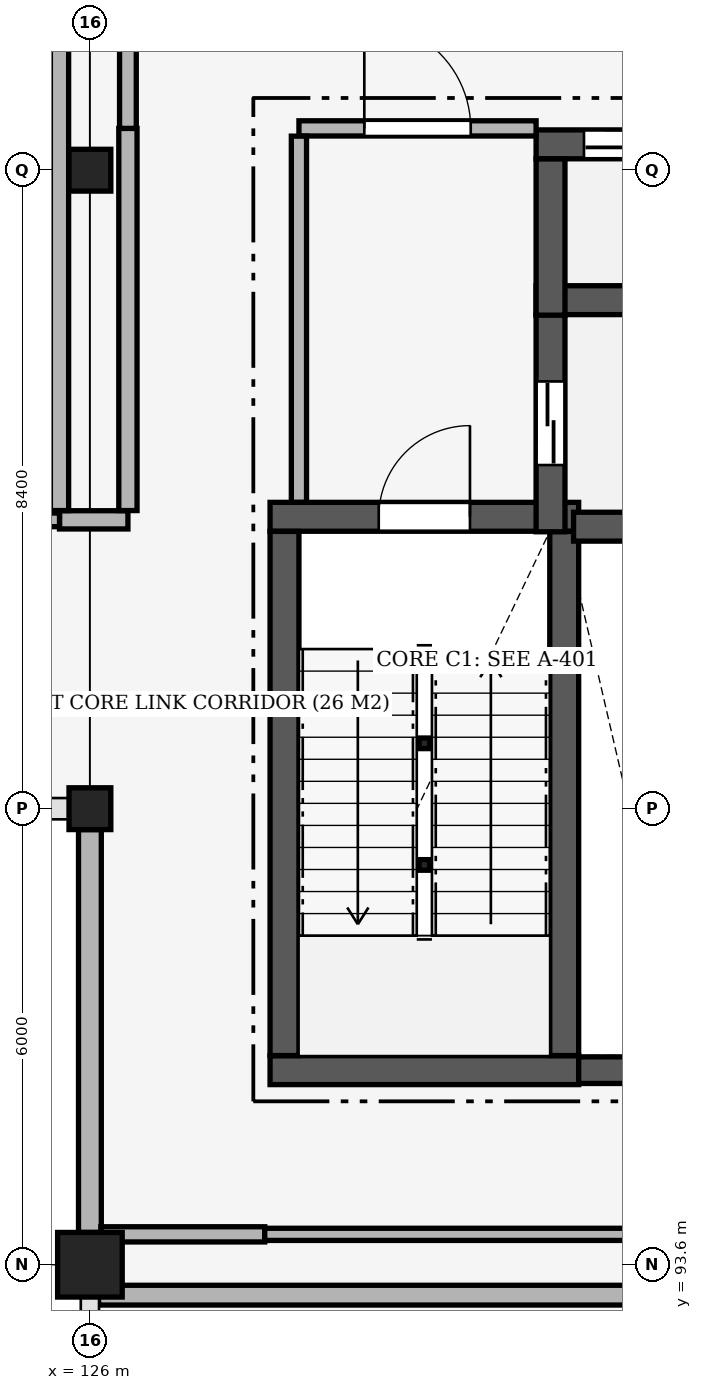
"""IFC4 building model, lengths in metres.
Left out: names, types, materials, properties, quantities, classifications, styles, units other than length and angle.
Written with IfcOpenShell. Run it as: python <this file> out.ifc"""

import sys

from ifc_helpers import new_model, si_unit, direction, frame, frame_2d, origin, origin_2d, place, context, subcontext, project, spatial, rectangle, hollow_circle, extrude, element, fill, save


model = new_model("IFC4")
c1 = context("Model", 3, precision=1e-05, world=origin(), true_north=direction((0.0, 1.0)))
c2 = subcontext(c1, "Body", "Model", "MODEL_VIEW")
j1 = project(units=[si_unit("LENGTHUNIT", "METRE"), si_unit("PLANEANGLEUNIT", "RADIAN")], contexts=[c1])
p1 = place(None, origin())
s1 = spatial("IfcSite", under=j1, at=p1, CompositionType="ELEMENT")
p2 = place(p1, origin())
s2 = spatial("IfcBuilding", under=s1, at=p2, CompositionType="ELEMENT")
p3 = place(p2, frame((0.0, 0.0, 5.1)))
s3 = spatial("IfcBuildingStorey", under=s2, at=p3, CompositionType="ELEMENT", Elevation=5.1)
p4 = place(p3, frame((126.0, 93.6, 0.0), z_axis=(0.0, 0.0, 1.0), x_axis=(1.0, 0.0, 0.0)))
e1 = element("IfcColumn", 1, at=p4, inside=s3, PredefinedType="COLUMN", context=c2, shape_type="SweptSolid", body=[
    extrude(rectangle(XDim=0.85, YDim=0.85, at=origin_2d()), origin(), (0.0, 0.0, 1.0), 5.1),
])
for number, where, z_axis, x_axis in (
    (2, (126.0, 99.6, 0.0), (0.0, 0.0, 1.0), (1.0, 0.0, 0.0)),
    (3, (126.0, 108.0, 0.0), (0.0, 0.0, 1.0), (1.0, 0.0, 0.0)),
):
    element("IfcColumn", number, at=place(p3, frame(where, z_axis=z_axis, x_axis=x_axis)), inside=s3, PredefinedType="COLUMN", context=c2, shape_type="SweptSolid", body=[
        extrude(rectangle(XDim=0.55, YDim=0.55, at=origin_2d()), origin(), (0.0, 0.0, 1.0), 5.1),
    ])
for number, where, z_axis, x_axis in (
    (4, (130.4, 98.86, -2.98), (0.0, 0.0, 1.0), (1.0, 0.0, 0.0)),
    (5, (130.4, 100.46, -2.98), (0.0, 0.0, 1.0), (1.0, 0.0, 0.0)),
):
    element("IfcColumn", number, at=place(p3, frame(where, z_axis=z_axis, x_axis=x_axis)), inside=s3, PredefinedType="COLUMN", context=c2, shape_type="SweptSolid", body=[
        extrude(hollow_circle(Radius=0.07, WallThickness=0.008, at=origin_2d()), origin(), (0.0, 0.0, 1.0), 5.1),
    ])
p5 = place(p3, frame((126.0, 94.025, 0.0), z_axis=(0.0, 0.0, 1.0), x_axis=(0.0, 1.0, 0.0)))
e6 = element("IfcWall", 6, at=p5, inside=s3, PredefinedType="SOLIDWALL", context=c2, shape_type="SweptSolid", body=[
    extrude(rectangle(XDim=5.3, YDim=0.3, at=frame_2d((2.65, 0.0))), origin(), (0.0, 0.0, 1.0), 4.27),
])
p6 = place(p3, frame((128.37, 103.44, 0.0), z_axis=(0.0, 0.0, 1.0), x_axis=(1.0, 0.0, 0.0)))
e7 = element("IfcWall", 7, at=p6, inside=s3, PredefinedType="SHEAR", context=c2, shape_type="SweptSolid", body=[
    extrude(rectangle(XDim=4.06, YDim=0.38, at=frame_2d((2.03, 0.0))), origin(), (0.0, 0.0, 1.0), 4.82),
])
p7 = place(p6, frame((1.43, 0.0, 0.0)))
e8 = element("IfcOpeningElement", 8, at=p7, cuts=e7, PredefinedType="OPENING", context=c2, shape_type="SweptSolid", body=[
    extrude(rectangle(XDim=1.2, YDim=2.2, at=frame_2d((0.6, 1.1))), frame((0.0, 0.205, 0.0), z_axis=(0.0, -1.0, 0.0), x_axis=(1.0, 0.0, 0.0)), (0.0, 0.0, 1.0), 0.41),
])
p8 = place(p3, frame((128.37, 96.16, 0.0), z_axis=(0.0, 0.0, 1.0), x_axis=(1.0, 0.0, 0.0)))
e9 = element("IfcWall", 9, at=p8, inside=s3, PredefinedType="SHEAR", context=c2, shape_type="SweptSolid", body=[
    extrude(rectangle(XDim=4.06, YDim=0.38, at=frame_2d((2.03, 0.0))), origin(), (0.0, 0.0, 1.0), 4.82),
])
for number, where, z_axis, x_axis in (
    (10, (128.56, 96.352, 0.0), (0.0, 0.0, 1.0), (0.0, 1.0, 0.0)),
    (11, (132.24, 96.352, 0.0), (0.0, 0.0, 1.0), (0.0, 1.0, 0.0)),
):
    element("IfcWall", number, at=place(p3, frame(where, z_axis=z_axis, x_axis=x_axis)), inside=s3, PredefinedType="SHEAR", context=c2, shape_type="SweptSolid", body=[
        extrude(rectangle(XDim=6.896, YDim=0.38, at=frame_2d((3.448, 0.0))), origin(), (0.0, 0.0, 1.0), 4.82),
    ])
p9 = place(p3, frame((132.363, 103.31, 0.0), z_axis=(0.0, 0.0, 1.0), x_axis=(1.0, 0.0, 0.0)))
e12 = element("IfcWall", 12, at=p9, inside=s3, PredefinedType="SHEAR", context=c2, shape_type="SweptSolid", body=[
    extrude(rectangle(XDim=1.867, YDim=0.38, at=frame_2d((0.934, 0.0))), origin(), (0.0, 0.0, 1.0), 4.82),
])
p10 = place(p3, frame((131.87, 106.29, 0.0), z_axis=(0.0, 0.0, 1.0), x_axis=(1.0, 0.0, 0.0)))
e13 = element("IfcWall", 13, at=p10, inside=s3, PredefinedType="SHEAR", context=c2, shape_type="SweptSolid", body=[
    extrude(rectangle(XDim=2.36, YDim=0.38, at=frame_2d((1.18, 0.0))), origin(), (0.0, 0.0, 1.0), 4.82),
])
p11 = place(p3, frame((132.06, 103.243, 0.0), z_axis=(0.0, 0.0, 1.0), x_axis=(0.0, 1.0, 0.0)))
e14 = element("IfcWall", 14, at=p11, inside=s3, PredefinedType="SHEAR", context=c2, shape_type="SweptSolid", body=[
    extrude(rectangle(XDim=2.855, YDim=0.38, at=frame_2d((1.427, 0.0))), origin(), (0.0, 0.0, 1.0), 4.82),
])
p12 = place(p11, frame((0.878, 0.0, 0.0)))
e15 = element("IfcOpeningElement", 15, at=p12, cuts=e14, PredefinedType="OPENING", context=c2, shape_type="SweptSolid", body=[
    extrude(rectangle(XDim=1.1, YDim=2.15, at=frame_2d((0.55, 1.075))), frame((0.0, 0.205, 0.0), z_axis=(0.0, -1.0, 0.0), x_axis=(1.0, 0.0, 0.0)), (0.0, 0.0, 1.0), 0.41),
])
p13 = place(p3, frame((131.87, 108.34, 0.0), z_axis=(0.0, 0.0, 1.0), x_axis=(1.0, 0.0, 0.0)))
e16 = element("IfcWall", 16, at=p13, inside=s3, PredefinedType="SHEAR", context=c2, shape_type="SweptSolid", body=[
    extrude(rectangle(XDim=2.36, YDim=0.38, at=frame_2d((1.18, 0.0))), origin(), (0.0, 0.0, 1.0), 4.82),
])
p14 = place(p13, frame((0.63, 0.0, 0.0)))
e17 = element("IfcOpeningElement", 17, at=p14, cuts=e16, PredefinedType="OPENING", context=c2, shape_type="SweptSolid", body=[
    extrude(rectangle(XDim=1.1, YDim=2.15, at=frame_2d((0.55, 1.075))), frame((0.0, 0.205, 0.0), z_axis=(0.0, -1.0, 0.0), x_axis=(1.0, 0.0, 0.0)), (0.0, 0.0, 1.0), 0.41),
])
p15 = place(p3, frame((132.06, 106.093, 0.0), z_axis=(0.0, 0.0, 1.0), x_axis=(0.0, 1.0, 0.0)))
e18 = element("IfcWall", 18, at=p15, inside=s3, PredefinedType="SHEAR", context=c2, shape_type="SweptSolid", body=[
    extrude(rectangle(XDim=2.055, YDim=0.38, at=frame_2d((1.027, 0.0))), origin(), (0.0, 0.0, 1.0), 4.82),
])
p16 = place(p3, frame((132.43, 96.16, 0.0), z_axis=(0.0, 0.0, 1.0), x_axis=(1.0, 0.0, 0.0)))
e19 = element("IfcWall", 19, at=p16, inside=s3, PredefinedType="SHEAR", context=c2, shape_type="SweptSolid", body=[
    extrude(rectangle(XDim=1.8, YDim=0.35, at=frame_2d((0.9, 0.0))), origin(), (0.0, 0.0, 1.0), 4.82),
])
p17 = place(p3, frame((126.114, 93.2, 0.0), z_axis=(0.0, 0.0, 1.0), x_axis=(1.0, 0.0, 0.0)))
e20 = element("IfcWall", 20, at=p17, inside=s3, PredefinedType="PARTITIONING", context=c2, shape_type="SweptSolid", body=[
    extrude(rectangle(XDim=12.686, YDim=0.26, at=frame_2d((6.343, 0.0))), origin(), (0.0, 0.0, 1.0), 4.02),
])
p18 = place(p3, frame((126.144, 94.0, 0.0), z_axis=(0.0, 0.0, 1.0), x_axis=(1.0, 0.0, 0.0)))
e21 = element("IfcWall", 21, at=p18, inside=s3, PredefinedType="PARTITIONING", context=c2, shape_type="SweptSolid", body=[
    extrude(rectangle(XDim=2.156, YDim=0.2, at=frame_2d((1.078, 0.0))), origin(), (0.0, 0.0, 1.0), 4.27),
])
p19 = place(p3, frame((128.3, 94.0, 0.0), z_axis=(0.0, 0.0, 1.0), x_axis=(1.0, 0.0, 0.0)))
e22 = element("IfcWall", 22, at=p19, inside=s3, PredefinedType="PARTITIONING", context=c2, shape_type="SweptSolid", body=[
    extrude(rectangle(XDim=10.5, YDim=0.16, at=frame_2d((5.25, 0.0))), origin(), (0.0, 0.0, 1.0), 4.27),
])
p20 = place(p3, frame((125.6, 103.4, 0.0), z_axis=(0.0, 0.0, 1.0), x_axis=(1.0, 0.0, 0.0)))
e23 = element("IfcWall", 23, at=p20, inside=s3, PredefinedType="PARTITIONING", context=c2, shape_type="SweptSolid", body=[
    extrude(rectangle(XDim=0.9, YDim=0.24, at=frame_2d((0.45, 0.0))), origin(), (0.0, 0.0, 1.0), 4.02),
])
p21 = place(p3, frame((92.4, 103.4, 0.0), z_axis=(0.0, 0.0, 1.0), x_axis=(1.0, 0.0, 0.0)))
e24 = element("IfcWall", 24, at=p21, inside=s3, PredefinedType="PARTITIONING", context=c2, shape_type="SweptSolid", body=[
    extrude(rectangle(XDim=33.2, YDim=0.18, at=frame_2d((16.6, 0.0))), origin(), (0.0, 0.0, 1.0), 4.02),
])
p22 = place(p21, frame((16.1, 0.0, 0.0)))
e25 = element("IfcOpeningElement", 25, at=p22, cuts=e24, PredefinedType="OPENING", context=c2, shape_type="SweptSolid", body=[
    extrude(rectangle(XDim=1.0, YDim=2.2, at=frame_2d((0.5, 1.1))), frame((0.0, 0.105, 0.0), z_axis=(0.0, -1.0, 0.0), x_axis=(1.0, 0.0, 0.0)), (0.0, 0.0, 1.0), 0.21),
])
p23 = place(p3, frame((128.75, 108.55, 0.0), z_axis=(0.0, 0.0, 1.0), x_axis=(1.0, 0.0, 0.0)))
e26 = element("IfcWall", 26, at=p23, inside=s3, PredefinedType="PARTITIONING", context=c2, shape_type="SweptSolid", body=[
    extrude(rectangle(XDim=3.12, YDim=0.2, at=frame_2d((1.56, 0.0))), origin(), (0.0, 0.0, 1.0), 4.82),
])
p24 = place(p23, frame((0.86, 0.0, 0.0)))
e27 = element("IfcOpeningElement", 27, at=p24, cuts=e26, PredefinedType="OPENING", context=c2, shape_type="SweptSolid", body=[
    extrude(rectangle(XDim=1.4, YDim=2.2, at=frame_2d((0.7, 1.1))), frame((0.0, 0.115, 0.0), z_axis=(0.0, -1.0, 0.0), x_axis=(1.0, 0.0, 0.0)), (0.0, 0.0, 1.0), 0.23),
])
p25 = place(p3, frame((125.6, 103.522, 0.0), z_axis=(0.0, 0.0, 1.0), x_axis=(0.0, 1.0, 0.0)))
e28 = element("IfcWall", 28, at=p25, inside=s3, PredefinedType="PARTITIONING", context=c2, shape_type="SweptSolid", body=[
    extrude(rectangle(XDim=9.726, YDim=0.24, at=frame_2d((4.863, 0.0))), origin(), (0.0, 0.0, 1.0), 4.12),
])
p26 = place(p3, frame((126.5, 103.522, 0.0), z_axis=(0.0, 0.0, 1.0), x_axis=(0.0, 1.0, 0.0)))
e29 = element("IfcWall", 29, at=p26, inside=s3, PredefinedType="PARTITIONING", context=c2, shape_type="SweptSolid", body=[
    extrude(rectangle(XDim=5.028, YDim=0.24, at=frame_2d((2.514, 0.0))), origin(), (0.0, 0.0, 1.0), 4.82),
])
p27 = place(p3, frame((126.5, 108.55, 0.0), z_axis=(0.0, 0.0, 1.0), x_axis=(0.0, 1.0, 0.0)))
e30 = element("IfcWall", 30, at=p27, inside=s3, PredefinedType="PARTITIONING", context=c2, shape_type="SweptSolid", body=[
    extrude(rectangle(XDim=3.788, YDim=0.22, at=frame_2d((1.894, 0.0))), origin(), (0.0, 0.0, 1.0), 4.82),
])
p28 = place(p3, frame((128.75, 103.632, 0.0), z_axis=(0.0, 0.0, 1.0), x_axis=(0.0, 1.0, 0.0)))
e31 = element("IfcWall", 31, at=p28, inside=s3, PredefinedType="PARTITIONING", context=c2, shape_type="SweptSolid", body=[
    extrude(rectangle(XDim=4.816, YDim=0.2, at=frame_2d((2.408, 0.0))), origin(), (0.0, 0.0, 1.0), 4.82),
])
p29 = place(p7, origin())
e32 = element("IfcDoor", 32, at=p29, inside=s3, OperationType="SINGLE_SWING_RIGHT", PredefinedType="DOOR", context=c2, shape_type="SweptSolid", body=[
    extrude(rectangle(XDim=1.2, YDim=2.2, at=frame_2d((0.6, 1.1))), frame((0.0, 0.025, 0.0), z_axis=(0.0, -1.0, 0.0), x_axis=(1.0, 0.0, 0.0)), (0.0, 0.0, 1.0), 0.05),
])
fill(e8, e32)
p30 = place(p12, origin())
e33 = element("IfcDoor", 33, at=p30, inside=s3, OperationType="DOUBLE_DOOR_SLIDING", PredefinedType="DOOR", context=c2, shape_type="SweptSolid", body=[
    extrude(rectangle(XDim=1.1, YDim=2.15, at=frame_2d((0.55, 1.075))), frame((0.0, 0.025, 0.0), z_axis=(0.0, -1.0, 0.0), x_axis=(1.0, 0.0, 0.0)), (0.0, 0.0, 1.0), 0.05),
])
fill(e15, e33)
p31 = place(p14, origin())
e34 = element("IfcDoor", 34, at=p31, inside=s3, OperationType="DOUBLE_DOOR_SLIDING", PredefinedType="DOOR", context=c2, shape_type="SweptSolid", body=[
    extrude(rectangle(XDim=1.1, YDim=2.15, at=frame_2d((0.55, 1.075))), frame((0.0, 0.025, 0.0), z_axis=(0.0, -1.0, 0.0), x_axis=(1.0, 0.0, 0.0)), (0.0, 0.0, 1.0), 0.05),
])
fill(e17, e34)
p32 = place(p24, origin())
e35 = element("IfcDoor", 35, at=p32, inside=s3, OperationType="SINGLE_SWING_LEFT", PredefinedType="DOOR", context=c2, shape_type="SweptSolid", body=[
    extrude(rectangle(XDim=1.4, YDim=2.2, at=frame_2d((0.7, 1.1))), frame((0.0, 0.025, 0.0), z_axis=(0.0, -1.0, 0.0), x_axis=(1.0, 0.0, 0.0)), (0.0, 0.0, 1.0), 0.05),
])
fill(e27, e35)
save(model, sys.argv[1])
